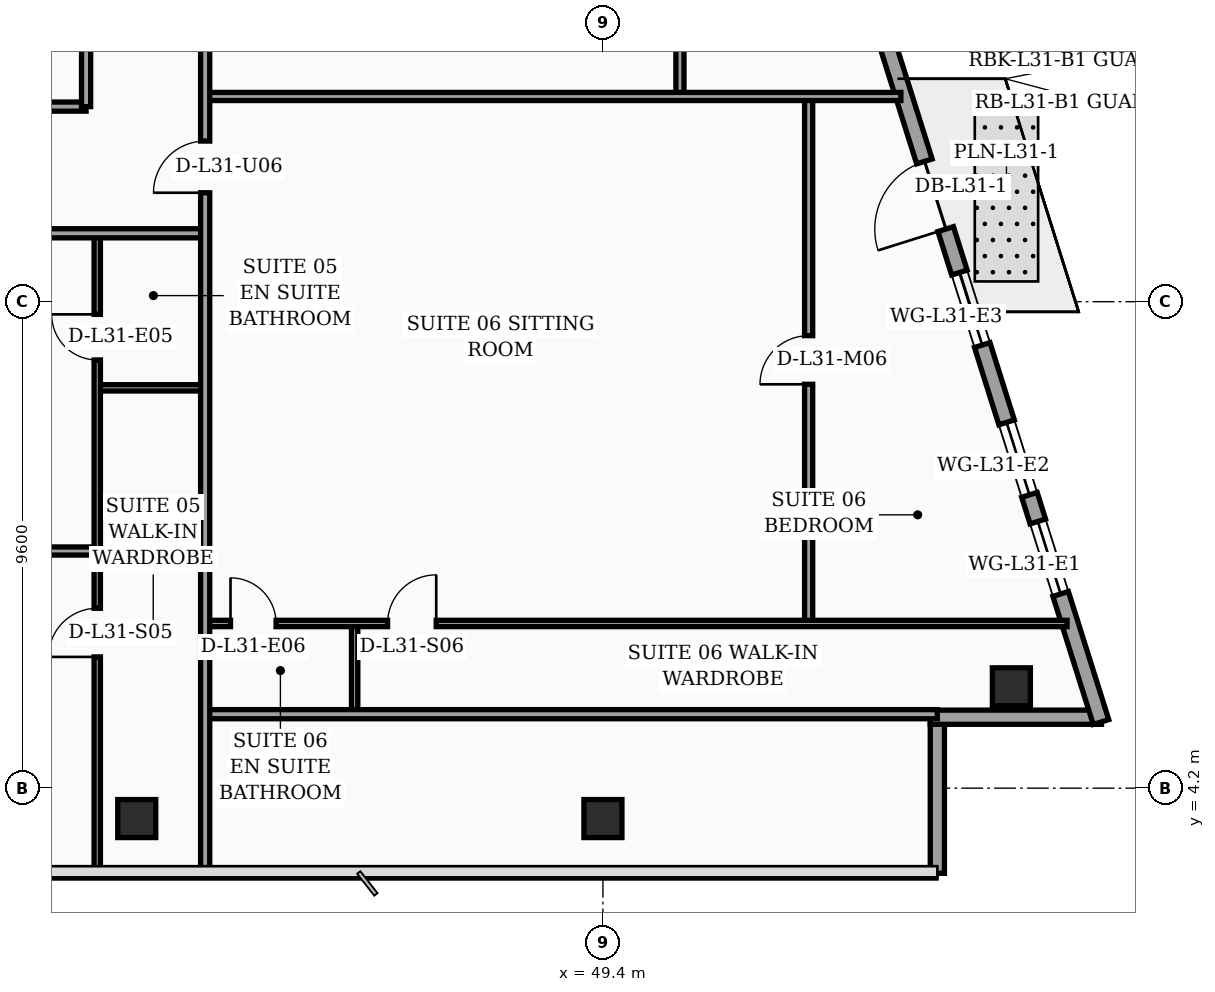
"""IFC4 building model, lengths in metres.
Left out: names, types, materials, properties, quantities, classifications, styles, units other than length and angle.
Written with IfcOpenShell. Run it as: python <this file> out.ifc"""

import sys

from ifc_helpers import new_model, si_unit, direction, frame, frame_2d, origin, origin_2d, place, context, subcontext, project, spatial, rectangle, hollow_rectangle, extrude, element, fill, save


model = new_model("IFC4")
c1 = context("Model", 3, precision=1e-05, world=origin(), true_north=direction((0.0, 1.0)))
c2 = subcontext(c1, "Body", "Model", "MODEL_VIEW")
j1 = project(units=[si_unit("LENGTHUNIT", "METRE"), si_unit("PLANEANGLEUNIT", "RADIAN")], contexts=[c1])
p1 = place(None, origin())
s1 = spatial("IfcSite", under=j1, at=p1, CompositionType="ELEMENT")
p2 = place(p1, origin())
s2 = spatial("IfcBuilding", under=s1, at=p2, CompositionType="ELEMENT")
p3 = place(p2, frame((0.0, 0.0, 127.8)))
s3 = spatial("IfcBuildingStorey", under=s2, at=p3, CompositionType="ELEMENT", Elevation=127.8)
for number, where, z_axis, x_axis in (
    (1, (40.2, 3.6, 0.0), (0.0, 0.0, 1.0), (1.0, 0.0, 0.0)),
    (2, (49.4, 3.6, 0.0), (0.0, 0.0, 1.0), (1.0, 0.0, 0.0)),
    (3, (57.461, 6.2, 0.0), (0.0, 0.0, 1.0), (1.0, 0.0, 0.0)),
):
    element("IfcColumn", number, at=place(p3, frame(where, z_axis=z_axis, x_axis=x_axis)), inside=s3, PredefinedType="COLUMN", context=c2, shape_type="SweptSolid", body=[
        extrude(hollow_rectangle(XDim=0.75, YDim=0.75, WallThickness=0.032, at=origin_2d()), origin(), (0.0, 0.0, 1.0), 3.56),
    ])
p4 = place(p3, frame((56.0, 2.52, 0.0), z_axis=(0.0, 0.0, 1.0), x_axis=(0.0, 1.0, 0.0)))
e4 = element("IfcWall", 4, at=p4, inside=s3, PredefinedType="SOLIDWALL", context=c2, shape_type="SweptSolid", body=[
    extrude(rectangle(XDim=2.94, YDim=0.28, at=frame_2d((1.47, 0.0))), origin(), (0.0, 0.0, 1.0), 3.04),
])
p5 = place(p3, frame((55.86, 5.6, 0.0), z_axis=(0.0, 0.0, 1.0), x_axis=(1.0, 0.0, 0.0)))
e5 = element("IfcWall", 5, at=p5, inside=s3, PredefinedType="SOLIDWALL", context=c2, shape_type="SweptSolid", body=[
    extrude(rectangle(XDim=3.38, YDim=0.28, at=frame_2d((1.69, 0.0))), origin(), (0.0, 0.0, 1.0), 3.04),
])
p6 = place(p3, frame((59.23, 5.505, 0.0), z_axis=(0.0, 0.0, 1.0), x_axis=(-0.300509063924, 0.953778958931, 0.0)))
e6 = element("IfcWall", 6, at=p6, inside=s3, PredefinedType="SOLIDWALL", context=c2, shape_type="SweptSolid", body=[
    extrude(rectangle(XDim=30.814, YDim=0.32, at=frame_2d((15.407, 0.0))), origin(), (0.0, 0.0, 1.0), 3.56),
])
p7 = place(p6, frame((10.199, 0.0, 0.0)))
e7 = element("IfcOpeningElement", 7, at=p7, cuts=e6, PredefinedType="OPENING", context=c2, shape_type="SweptSolid", body=[
    extrude(rectangle(XDim=1.4, YDim=2.25, at=frame_2d((0.7, 1.125))), frame((0.0, 0.17, 0.0), z_axis=(0.0, -1.0, 0.0), x_axis=(1.0, 0.0, 0.0)), (0.0, 0.0, 1.0), 0.34),
])
p8 = place(p6, frame((2.65, 0.0, 0.75)))
e8 = element("IfcOpeningElement", 8, at=p8, cuts=e6, PredefinedType="OPENING", context=c2, shape_type="SweptSolid", body=[
    extrude(rectangle(XDim=1.5, YDim=1.6, at=frame_2d((0.75, 0.8))), frame((0.0, 0.17, 0.0), z_axis=(0.0, -1.0, 0.0), x_axis=(1.0, 0.0, 0.0)), (0.0, 0.0, 1.0), 0.34),
])
p9 = place(p6, frame((4.7, 0.0, 0.75)))
e9 = element("IfcOpeningElement", 9, at=p9, cuts=e6, PredefinedType="OPENING", context=c2, shape_type="SweptSolid", body=[
    extrude(rectangle(XDim=1.5, YDim=1.6, at=frame_2d((0.75, 0.8))), frame((0.0, 0.17, 0.0), z_axis=(0.0, -1.0, 0.0), x_axis=(1.0, 0.0, 0.0)), (0.0, 0.0, 1.0), 0.34),
])
p10 = place(p6, frame((7.8, 0.0, 0.75)))
e10 = element("IfcOpeningElement", 10, at=p10, cuts=e6, PredefinedType="OPENING", context=c2, shape_type="SweptSolid", body=[
    extrude(rectangle(XDim=1.5, YDim=1.6, at=frame_2d((0.75, 0.8))), frame((0.0, 0.17, 0.0), z_axis=(0.0, -1.0, 0.0), x_axis=(1.0, 0.0, 0.0)), (0.0, 0.0, 1.0), 0.34),
])
p11 = place(p6, frame((14.0, 0.0, 0.75)))
e11 = element("IfcOpeningElement", 11, at=p11, cuts=e6, PredefinedType="OPENING", context=c2, shape_type="SweptSolid", body=[
    extrude(rectangle(XDim=1.5, YDim=1.6, at=frame_2d((0.75, 0.8))), frame((0.0, 0.17, 0.0), z_axis=(0.0, -1.0, 0.0), x_axis=(1.0, 0.0, 0.0)), (0.0, 0.0, 1.0), 0.34),
])
p12 = place(p6, frame((17.1, 0.0, 0.75)))
e12 = element("IfcOpeningElement", 12, at=p12, cuts=e6, PredefinedType="OPENING", context=c2, shape_type="SweptSolid", body=[
    extrude(rectangle(XDim=1.5, YDim=1.6, at=frame_2d((0.75, 0.8))), frame((0.0, 0.17, 0.0), z_axis=(0.0, -1.0, 0.0), x_axis=(1.0, 0.0, 0.0)), (0.0, 0.0, 1.0), 0.34),
])
p13 = place(p6, frame((23.3, 0.0, 0.75)))
e13 = element("IfcOpeningElement", 13, at=p13, cuts=e6, PredefinedType="OPENING", context=c2, shape_type="SweptSolid", body=[
    extrude(rectangle(XDim=1.5, YDim=1.6, at=frame_2d((0.75, 0.8))), frame((0.0, 0.17, 0.0), z_axis=(0.0, -1.0, 0.0), x_axis=(1.0, 0.0, 0.0)), (0.0, 0.0, 1.0), 0.34),
])
p14 = place(p6, frame((27.45, 0.0, 0.75)))
e14 = element("IfcOpeningElement", 14, at=p14, cuts=e6, PredefinedType="OPENING", context=c2, shape_type="SweptSolid", body=[
    extrude(rectangle(XDim=1.5, YDim=1.6, at=frame_2d((0.75, 0.8))), frame((0.0, 0.17, 0.0), z_axis=(0.0, -1.0, 0.0), x_axis=(1.0, 0.0, 0.0)), (0.0, 0.0, 1.0), 0.34),
])
p15 = place(p3, frame((39.42, 12.1, 0.0), z_axis=(0.0, 0.0, 1.0), x_axis=(1.0, 0.0, 0.0)))
e15 = element("IfcWall", 15, at=p15, inside=s3, PredefinedType="PARTITIONING", context=c2, shape_type="SweptSolid", body=[
    extrude(rectangle(XDim=2.13, YDim=0.125, at=frame_2d((1.065, 0.0))), origin(), (0.0, 0.0, 1.0), 3.56),
])
p16 = place(p3, frame((32.4, 8.88, 0.0), z_axis=(0.0, 0.0, 1.0), x_axis=(1.0, 0.0, 0.0)))
e16 = element("IfcWall", 16, at=p16, inside=s3, PredefinedType="PARTITIONING", context=c2, shape_type="SweptSolid", body=[
    extrude(rectangle(XDim=7.02, YDim=0.16, at=frame_2d((3.51, 0.0))), origin(), (0.0, 0.0, 1.0), 2.84),
])
p17 = place(p16, frame((3.03, 0.0, 0.0)))
e17 = element("IfcOpeningElement", 17, at=p17, cuts=e16, PredefinedType="OPENING", context=c2, shape_type="SweptSolid", body=[
    extrude(rectangle(XDim=0.96, YDim=2.2, at=frame_2d((0.48, 1.1))), frame((0.0, 0.09, 0.0), z_axis=(0.0, -1.0, 0.0), x_axis=(1.0, 0.0, 0.0)), (0.0, 0.0, 1.0), 0.18),
])
p18 = place(p3, frame((39.42, 2.44, 0.0), z_axis=(0.0, 0.0, 1.0), x_axis=(0.0, 1.0, 0.0)))
e18 = element("IfcWall", 18, at=p18, inside=s3, PredefinedType="PARTITIONING", context=c2, shape_type="SweptSolid", body=[
    extrude(rectangle(XDim=12.71, YDim=0.125, at=frame_2d((6.355, 0.0))), origin(), (0.0, 0.0, 1.0), 2.84),
])
p19 = place(p18, frame((4.35, 0.0, 0.0)))
e19 = element("IfcOpeningElement", 19, at=p19, cuts=e18, PredefinedType="OPENING", context=c2, shape_type="SweptSolid", body=[
    extrude(rectangle(XDim=0.96, YDim=2.2, at=frame_2d((0.48, 1.1))), frame((0.0, 0.073, 0.0), z_axis=(0.0, -1.0, 0.0), x_axis=(1.0, 0.0, 0.0)), (0.0, 0.0, 1.0), 0.145),
])
p20 = place(p18, frame((10.21, 0.0, 0.0)))
e20 = element("IfcOpeningElement", 20, at=p20, cuts=e18, PredefinedType="OPENING", context=c2, shape_type="SweptSolid", body=[
    extrude(rectangle(XDim=0.9, YDim=2.15, at=frame_2d((0.45, 1.075))), frame((0.0, 0.073, 0.0), z_axis=(0.0, -1.0, 0.0), x_axis=(1.0, 0.0, 0.0)), (0.0, 0.0, 1.0), 0.145),
])
p21 = place(p3, frame((32.4, 15.15, 0.0), z_axis=(0.0, 0.0, 1.0), x_axis=(1.0, 0.0, 0.0)))
e21 = element("IfcWall", 21, at=p21, inside=s3, PredefinedType="PARTITIONING", context=c2, shape_type="SweptSolid", body=[
    extrude(rectangle(XDim=9.15, YDim=0.18, at=frame_2d((4.575, 0.0))), origin(), (0.0, 0.0, 1.0), 2.84),
])
p22 = place(p21, frame((3.1, 0.0, 0.0)))
e22 = element("IfcOpeningElement", 22, at=p22, cuts=e21, PredefinedType="OPENING", context=c2, shape_type="SweptSolid", body=[
    extrude(rectangle(XDim=1.02, YDim=2.2, at=frame_2d((0.51, 1.1))), frame((0.0, 0.1, 0.0), z_axis=(0.0, -1.0, 0.0), x_axis=(1.0, 0.0, 0.0)), (0.0, 0.0, 1.0), 0.2),
])
p23 = place(p3, frame((21.5, 17.65, 0.0), z_axis=(0.0, 0.0, 1.0), x_axis=(1.0, 0.0, 0.0)))
e23 = element("IfcWall", 23, at=p23, inside=s3, PredefinedType="PARTITIONING", context=c2, shape_type="SweptSolid", body=[
    extrude(rectangle(XDim=17.7, YDim=0.18, at=frame_2d((8.85, 0.0))), origin(), (0.0, 0.0, 1.0), 2.84),
])
p24 = place(p23, frame((0.95, 0.0, 0.0)))
e24 = element("IfcOpeningElement", 24, at=p24, cuts=e23, PredefinedType="OPENING", context=c2, shape_type="SweptSolid", body=[
    extrude(rectangle(XDim=1.02, YDim=2.2, at=frame_2d((0.51, 1.1))), frame((0.0, 0.1, 0.0), z_axis=(0.0, -1.0, 0.0), x_axis=(1.0, 0.0, 0.0)), (0.0, 0.0, 1.0), 0.2),
])
p25 = place(p23, frame((10.4, 0.0, 0.0)))
e25 = element("IfcOpeningElement", 25, at=p25, cuts=e23, PredefinedType="OPENING", context=c2, shape_type="SweptSolid", body=[
    extrude(rectangle(XDim=1.02, YDim=2.2, at=frame_2d((0.51, 1.1))), frame((0.0, 0.1, 0.0), z_axis=(0.0, -1.0, 0.0), x_axis=(1.0, 0.0, 0.0)), (0.0, 0.0, 1.0), 0.2),
])
p26 = place(p3, frame((39.2, 17.65, 0.0), z_axis=(0.0, 0.0, 1.0), x_axis=(0.0, 1.0, 0.0)))
e26 = element("IfcWall", 26, at=p26, inside=s3, PredefinedType="PARTITIONING", context=c2, shape_type="SweptSolid", body=[
    extrude(rectangle(XDim=16.64, YDim=0.18, at=frame_2d((8.32, 0.0))), origin(), (0.0, 0.0, 1.0), 2.84),
])
p27 = place(p3, frame((44.5, 5.66, 0.0), z_axis=(0.0, 0.0, 1.0), x_axis=(0.0, 1.0, 0.0)))
e27 = element("IfcWall", 27, at=p27, inside=s3, PredefinedType="PARTITIONING", context=c2, shape_type="SweptSolid", body=[
    extrude(rectangle(XDim=1.79, YDim=0.125, at=frame_2d((0.895, 0.0))), origin(), (0.0, 0.0, 1.0), 3.56),
])
p28 = place(p3, frame((53.46, 7.45, 0.0), z_axis=(0.0, 0.0, 1.0), x_axis=(0.0, 1.0, 0.0)))
e28 = element("IfcWall", 28, at=p28, inside=s3, PredefinedType="PARTITIONING", context=c2, shape_type="SweptSolid", body=[
    extrude(rectangle(XDim=10.4, YDim=0.16, at=frame_2d((5.2, 0.0))), origin(), (0.0, 0.0, 1.0), 3.04),
])
p29 = place(p28, frame((4.72, 0.0, 0.0)))
e29 = element("IfcOpeningElement", 29, at=p29, cuts=e28, PredefinedType="OPENING", context=c2, shape_type="SweptSolid", body=[
    extrude(rectangle(XDim=0.96, YDim=2.2, at=frame_2d((0.48, 1.1))), frame((0.0, 0.09, 0.0), z_axis=(0.0, -1.0, 0.0), x_axis=(1.0, 0.0, 0.0)), (0.0, 0.0, 1.0), 0.18),
])
p30 = place(p3, frame((41.55, 7.45, 0.0), z_axis=(0.0, 0.0, 1.0), x_axis=(1.0, 0.0, 0.0)))
e30 = element("IfcWall", 30, at=p30, inside=s3, PredefinedType="PARTITIONING", context=c2, shape_type="SweptSolid", body=[
    extrude(rectangle(XDim=17.01, YDim=0.125, at=frame_2d((8.505, 0.0))), origin(), (0.0, 0.0, 1.0), 2.84),
])
p31 = place(p30, frame((0.5, 0.0, 0.0)))
e31 = element("IfcOpeningElement", 31, at=p31, cuts=e30, PredefinedType="OPENING", context=c2, shape_type="SweptSolid", body=[
    extrude(rectangle(XDim=0.9, YDim=2.15, at=frame_2d((0.45, 1.075))), frame((0.0, 0.073, 0.0), z_axis=(0.0, -1.0, 0.0), x_axis=(1.0, 0.0, 0.0)), (0.0, 0.0, 1.0), 0.145),
])
p32 = place(p30, frame((3.6, 0.0, 0.0)))
e32 = element("IfcOpeningElement", 32, at=p32, cuts=e30, PredefinedType="OPENING", context=c2, shape_type="SweptSolid", body=[
    extrude(rectangle(XDim=0.96, YDim=2.2, at=frame_2d((0.48, 1.1))), frame((0.0, 0.073, 0.0), z_axis=(0.0, -1.0, 0.0), x_axis=(1.0, 0.0, 0.0)), (0.0, 0.0, 1.0), 0.145),
])
p33 = place(p3, frame((41.55, 5.66, 0.0), z_axis=(0.0, 0.0, 1.0), x_axis=(1.0, 0.0, 0.0)))
e33 = element("IfcWall", 33, at=p33, inside=s3, PredefinedType="PARTITIONING", context=c2, shape_type="SweptSolid", body=[
    extrude(rectangle(XDim=14.45, YDim=0.18, at=frame_2d((7.225, 0.0))), origin(), (0.0, 0.0, 1.0), 2.84),
])
p34 = place(p3, frame((50.92, 17.85, 0.0), z_axis=(0.0, 0.0, 1.0), x_axis=(0.0, 1.0, 0.0)))
e34 = element("IfcWall", 34, at=p34, inside=s3, PredefinedType="PARTITIONING", context=c2, shape_type="SweptSolid", body=[
    extrude(rectangle(XDim=5.74, YDim=0.16, at=frame_2d((2.87, 0.0))), origin(), (0.0, 0.0, 1.0), 2.84),
])
p35 = place(p34, frame((2.39, 0.0, 0.0)))
e35 = element("IfcOpeningElement", 35, at=p35, cuts=e34, PredefinedType="OPENING", context=c2, shape_type="SweptSolid", body=[
    extrude(rectangle(XDim=0.96, YDim=2.2, at=frame_2d((0.48, 1.1))), frame((0.0, 0.09, 0.0), z_axis=(0.0, -1.0, 0.0), x_axis=(1.0, 0.0, 0.0)), (0.0, 0.0, 1.0), 0.18),
])
p36 = place(p3, frame((41.55, 17.85, 0.0), z_axis=(0.0, 0.0, 1.0), x_axis=(1.0, 0.0, 0.0)))
e36 = element("IfcWall", 36, at=p36, inside=s3, PredefinedType="PARTITIONING", context=c2, shape_type="SweptSolid", body=[
    extrude(rectangle(XDim=13.73, YDim=0.16, at=frame_2d((6.865, 0.0))), origin(), (0.0, 0.0, 1.0), 2.84),
])
p37 = place(p3, frame((41.55, 2.44, 0.0), z_axis=(0.0, 0.0, 1.0), x_axis=(0.0, 1.0, 0.0)))
e37 = element("IfcWall", 37, at=p37, inside=s3, PredefinedType="PARTITIONING", context=c2, shape_type="SweptSolid", body=[
    extrude(rectangle(XDim=31.04, YDim=0.18, at=frame_2d((15.52, 0.0))), origin(), (0.0, 0.0, 1.0), 2.84),
])
p38 = place(p37, frame((13.51, 0.0, 0.0)))
e38 = element("IfcOpeningElement", 38, at=p38, cuts=e37, PredefinedType="OPENING", context=c2, shape_type="SweptSolid", body=[
    extrude(rectangle(XDim=1.02, YDim=2.2, at=frame_2d((0.51, 1.1))), frame((0.0, 0.1, 0.0), z_axis=(0.0, -1.0, 0.0), x_axis=(1.0, 0.0, 0.0)), (0.0, 0.0, 1.0), 0.2),
])
p39 = place(p37, frame((17.77, 0.0, 0.0)))
e39 = element("IfcOpeningElement", 39, at=p39, cuts=e37, PredefinedType="OPENING", context=c2, shape_type="SweptSolid", body=[
    extrude(rectangle(XDim=1.02, YDim=2.2, at=frame_2d((0.51, 1.1))), frame((0.0, 0.1, 0.0), z_axis=(0.0, -1.0, 0.0), x_axis=(1.0, 0.0, 0.0)), (0.0, 0.0, 1.0), 0.2),
])
p40 = place(p37, frame((25.58, 0.0, 0.0)))
e40 = element("IfcOpeningElement", 40, at=p40, cuts=e37, PredefinedType="OPENING", context=c2, shape_type="SweptSolid", body=[
    extrude(rectangle(XDim=1.02, YDim=2.2, at=frame_2d((0.51, 1.1))), frame((0.0, 0.1, 0.0), z_axis=(0.0, -1.0, 0.0), x_axis=(1.0, 0.0, 0.0)), (0.0, 0.0, 1.0), 0.2),
])
p41 = place(p7, origin())
e41 = element("IfcDoor", 41, at=p41, inside=s3, OperationType="SINGLE_SWING_LEFT", PredefinedType="DOOR", context=c2, shape_type="SweptSolid", body=[
    extrude(rectangle(XDim=1.4, YDim=2.25, at=frame_2d((0.7, 1.125))), frame((0.0, 0.025, 0.0), z_axis=(0.0, -1.0, 0.0), x_axis=(1.0, 0.0, 0.0)), (0.0, 0.0, 1.0), 0.05),
])
fill(e7, e41)
p42 = place(p8, origin())
e42 = element("IfcWindow", 42, at=p42, inside=s3, PartitioningType="SINGLE_PANEL", PredefinedType="WINDOW", context=c2, shape_type="SweptSolid", body=[
    extrude(rectangle(XDim=1.5, YDim=1.6, at=frame_2d((0.75, 0.8))), frame((0.0, 0.03, 0.0), z_axis=(0.0, -1.0, 0.0), x_axis=(1.0, 0.0, 0.0)), (0.0, 0.0, 1.0), 0.06),
])
fill(e8, e42)
p43 = place(p9, origin())
e43 = element("IfcWindow", 43, at=p43, inside=s3, PartitioningType="SINGLE_PANEL", PredefinedType="WINDOW", context=c2, shape_type="SweptSolid", body=[
    extrude(rectangle(XDim=1.5, YDim=1.6, at=frame_2d((0.75, 0.8))), frame((0.0, 0.03, 0.0), z_axis=(0.0, -1.0, 0.0), x_axis=(1.0, 0.0, 0.0)), (0.0, 0.0, 1.0), 0.06),
])
fill(e9, e43)
p44 = place(p10, origin())
e44 = element("IfcWindow", 44, at=p44, inside=s3, PartitioningType="SINGLE_PANEL", PredefinedType="WINDOW", context=c2, shape_type="SweptSolid", body=[
    extrude(rectangle(XDim=1.5, YDim=1.6, at=frame_2d((0.75, 0.8))), frame((0.0, 0.03, 0.0), z_axis=(0.0, -1.0, 0.0), x_axis=(1.0, 0.0, 0.0)), (0.0, 0.0, 1.0), 0.06),
])
fill(e10, e44)
p45 = place(p19, origin())
e45 = element("IfcDoor", 45, at=p45, inside=s3, OperationType="SINGLE_SWING_LEFT", PredefinedType="DOOR", context=c2, shape_type="SweptSolid", body=[
    extrude(rectangle(XDim=0.96, YDim=2.2, at=frame_2d((0.48, 1.1))), frame((0.0, 0.025, 0.0), z_axis=(0.0, -1.0, 0.0), x_axis=(1.0, 0.0, 0.0)), (0.0, 0.0, 1.0), 0.05),
])
fill(e19, e45)
p46 = place(p20, origin())
e46 = element("IfcDoor", 46, at=p46, inside=s3, OperationType="SINGLE_SWING_RIGHT", PredefinedType="DOOR", context=c2, shape_type="SweptSolid", body=[
    extrude(rectangle(XDim=0.9, YDim=2.15, at=frame_2d((0.45, 1.075))), frame((0.0, 0.025, 0.0), z_axis=(0.0, -1.0, 0.0), x_axis=(1.0, 0.0, 0.0)), (0.0, 0.0, 1.0), 0.05),
])
fill(e20, e46)
p47 = place(p29, origin())
e47 = element("IfcDoor", 47, at=p47, inside=s3, OperationType="SINGLE_SWING_LEFT", PredefinedType="DOOR", context=c2, shape_type="SweptSolid", body=[
    extrude(rectangle(XDim=0.96, YDim=2.2, at=frame_2d((0.48, 1.1))), frame((0.0, 0.025, 0.0), z_axis=(0.0, -1.0, 0.0), x_axis=(1.0, 0.0, 0.0)), (0.0, 0.0, 1.0), 0.05),
])
fill(e29, e47)
p48 = place(p31, origin())
e48 = element("IfcDoor", 48, at=p48, inside=s3, OperationType="SINGLE_SWING_LEFT", PredefinedType="DOOR", context=c2, shape_type="SweptSolid", body=[
    extrude(rectangle(XDim=0.9, YDim=2.15, at=frame_2d((0.45, 1.075))), frame((0.0, 0.025, 0.0), z_axis=(0.0, -1.0, 0.0), x_axis=(1.0, 0.0, 0.0)), (0.0, 0.0, 1.0), 0.05),
])
fill(e31, e48)
p49 = place(p32, origin())
e49 = element("IfcDoor", 49, at=p49, inside=s3, OperationType="SINGLE_SWING_RIGHT", PredefinedType="DOOR", context=c2, shape_type="SweptSolid", body=[
    extrude(rectangle(XDim=0.96, YDim=2.2, at=frame_2d((0.48, 1.1))), frame((0.0, 0.025, 0.0), z_axis=(0.0, -1.0, 0.0), x_axis=(1.0, 0.0, 0.0)), (0.0, 0.0, 1.0), 0.05),
])
fill(e32, e49)
p50 = place(p38, origin())
e50 = element("IfcDoor", 50, at=p50, inside=s3, OperationType="SINGLE_SWING_LEFT", PredefinedType="DOOR", context=c2, shape_type="SweptSolid", body=[
    extrude(rectangle(XDim=1.02, YDim=2.2, at=frame_2d((0.51, 1.1))), frame((0.0, 0.025, 0.0), z_axis=(0.0, -1.0, 0.0), x_axis=(1.0, 0.0, 0.0)), (0.0, 0.0, 1.0), 0.05),
])
fill(e38, e50)
save(model, sys.argv[1])
